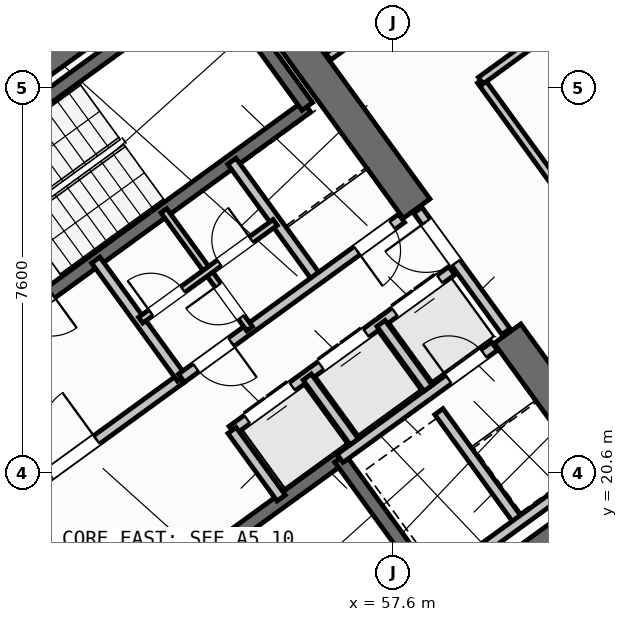
"""IFC4 building model, lengths in metres.
Left out: names, types, materials, properties, quantities, classifications, styles, units other than length and angle.
Written with IfcOpenShell. Run it as: python <this file> out.ifc"""

import sys

from ifc_helpers import new_model, si_unit, direction, frame, frame_2d, origin, place, context, subcontext, project, spatial, rectangle, extrude, source, transform, mapped, element, fill, save


model = new_model("IFC4")
c1 = context("Model", 3, precision=1e-05, world=origin(), true_north=direction((0.0, 1.0)))
c2 = subcontext(c1, "Body", "Model", "MODEL_VIEW")
j1 = project(units=[si_unit("LENGTHUNIT", "METRE"), si_unit("PLANEANGLEUNIT", "RADIAN")], contexts=[c1])
p1 = place(None, origin())
s1 = spatial("IfcSite", under=j1, at=p1, CompositionType="ELEMENT")
p2 = place(p1, origin())
s2 = spatial("IfcBuilding", under=s1, at=p2, CompositionType="ELEMENT")
p3 = place(p2, frame((0.0, 0.0, 34.8)))
s3 = spatial("IfcBuildingStorey", under=s2, at=p3, CompositionType="ELEMENT", Elevation=34.8)
p4 = place(p3, frame((52.318, 13.11, 0.0), z_axis=(0.0, 0.0, 1.0), x_axis=(0.809019445368, 0.587781878776, 0.0)))
e1 = element("IfcWall", 1, at=p4, inside=s3, PredefinedType="SHEAR", context=c2, shape_type="SweptSolid", body=[
    extrude(rectangle(XDim=12.44, YDim=0.65, at=frame_2d((6.22, 0.0))), origin(), (0.0, 0.0, 1.0), 3.35),
])
p5 = place(p3, frame((44.325, 24.113, 0.0), z_axis=(0.0, 0.0, 1.0), x_axis=(0.809012664862, 0.58779121131, 0.0)))
e2 = element("IfcWall", 2, at=p5, inside=s3, PredefinedType="SHEAR", context=c2, shape_type="SweptSolid", body=[
    extrude(rectangle(XDim=12.44, YDim=0.65, at=frame_2d((6.22, 0.0))), origin(), (0.0, 0.0, 1.0), 3.35),
])
p6 = place(p3, frame((61.929, 20.494, 0.0), z_axis=(0.0, 0.0, 1.0), x_axis=(-0.58782982593, 0.808984607855, 0.0)))
e3 = element("IfcWall", 3, at=p6, inside=s3, PredefinedType="SHEAR", context=c2, shape_type="SweptSolid", body=[
    extrude(rectangle(XDim=3.525, YDim=0.65, at=frame_2d((1.762, 0.0))), origin(), (0.0, 0.0, 1.0), 3.35),
])
p7 = place(p3, frame((58.064, 25.813, 0.0), z_axis=(0.0, 0.0, 1.0), x_axis=(-0.58777996584, 0.809020835181, 0.0)))
e4 = element("IfcWall", 4, at=p7, inside=s3, PredefinedType="SHEAR", context=c2, shape_type="SweptSolid", body=[
    extrude(rectangle(XDim=6.375, YDim=0.65, at=frame_2d((3.188, 0.0))), origin(), (0.0, 0.0, 1.0), 3.35),
])
p8 = place(p3, frame((43.938, 25.192, 0.0), z_axis=(0.0, 0.0, 1.0), x_axis=(0.809016324578, 0.587786174187, 0.0)))
e5 = element("IfcWall", 5, at=p8, inside=s3, PredefinedType="STANDARD", context=c2, shape_type="SweptSolid", body=[
    extrude(rectangle(XDim=17.587, YDim=0.32, at=frame_2d((8.794, 0.0))), origin(), (0.0, 0.0, 1.0), 3.35),
])
p9 = place(p8, frame((14.914, 0.0, 0.0)))
e6 = element("IfcOpeningElement", 6, at=p9, cuts=e5, PredefinedType="OPENING", context=c2, shape_type="SweptSolid", body=[
    extrude(rectangle(XDim=1.05, YDim=2.15, at=frame_2d((0.525, 1.075))), frame((0.0, 0.17, 0.0), z_axis=(0.0, -1.0, 0.0), x_axis=(1.0, 0.0, 0.0)), (0.0, 0.0, 1.0), 0.34),
])
p10 = place(p8, frame((2.169, 0.0, 0.8)))
e7 = element("IfcOpeningElement", 7, at=p10, cuts=e5, PredefinedType="OPENING", context=c2, shape_type="SweptSolid", body=[
    extrude(rectangle(XDim=2.1, YDim=1.55, at=frame_2d((1.05, 0.775))), frame((0.0, 0.17, 0.0), z_axis=(0.0, -1.0, 0.0), x_axis=(1.0, 0.0, 0.0)), (0.0, 0.0, 1.0), 0.34),
])
p11 = place(p8, frame((7.319, 0.0, 0.8)))
e8 = element("IfcOpeningElement", 8, at=p11, cuts=e5, PredefinedType="OPENING", context=c2, shape_type="SweptSolid", body=[
    extrude(rectangle(XDim=2.1, YDim=1.55, at=frame_2d((1.05, 0.775))), frame((0.0, 0.17, 0.0), z_axis=(0.0, -1.0, 0.0), x_axis=(1.0, 0.0, 0.0)), (0.0, 0.0, 1.0), 0.34),
])
p12 = place(p3, frame((58.455, 35.484, 0.0), z_axis=(0.0, 0.0, 1.0), x_axis=(0.587783625747, -0.809018176127, 0.0)))
e9 = element("IfcWall", 9, at=p12, inside=s3, PredefinedType="STANDARD", context=c2, shape_type="SweptSolid", body=[
    extrude(rectangle(XDim=21.587, YDim=0.32, at=frame_2d((10.794, 0.0))), origin(), (0.0, 0.0, 1.0), 2.725),
])
p13 = place(p12, frame((1.529, 0.0, 0.85)))
e10 = element("IfcOpeningElement", 10, at=p13, cuts=e9, PredefinedType="OPENING", context=c2, shape_type="SweptSolid", body=[
    extrude(rectangle(XDim=1.8, YDim=1.5, at=frame_2d((0.9, 0.75))), frame((0.0, 0.17, 0.0), z_axis=(0.0, -1.0, 0.0), x_axis=(1.0, 0.0, 0.0)), (0.0, 0.0, 1.0), 0.34),
])
p14 = place(p12, frame((10.444, 0.0, 0.85)))
e11 = element("IfcOpeningElement", 11, at=p14, cuts=e9, PredefinedType="OPENING", context=c2, shape_type="SweptSolid", body=[
    extrude(rectangle(XDim=1.8, YDim=1.5, at=frame_2d((0.9, 0.75))), frame((0.0, 0.17, 0.0), z_axis=(0.0, -1.0, 0.0), x_axis=(1.0, 0.0, 0.0)), (0.0, 0.0, 1.0), 0.34),
])
p15 = place(p12, frame((17.595, 0.0, 0.85)))
e12 = element("IfcOpeningElement", 12, at=p15, cuts=e9, PredefinedType="OPENING", context=c2, shape_type="SweptSolid", body=[
    extrude(rectangle(XDim=1.5, YDim=1.5, at=frame_2d((0.75, 0.75))), frame((0.0, 0.17, 0.0), z_axis=(0.0, -1.0, 0.0), x_axis=(1.0, 0.0, 0.0)), (0.0, 0.0, 1.0), 0.34),
])
p16 = place(p3, frame((48.006, 25.996, 0.0), z_axis=(0.0, 0.0, 1.0), x_axis=(0.80901903764, 0.587782439969, 0.0)))
e13 = element("IfcWall", 13, at=p16, inside=s3, PredefinedType="SHEAR", context=c2, shape_type="SweptSolid", body=[
    extrude(rectangle(XDim=7.46, YDim=0.26, at=frame_2d((3.73, 0.0))), origin(), (0.0, 0.0, 1.0), 3.35),
])
p17 = place(p3, frame((49.863, 23.44, 0.0), z_axis=(0.0, 0.0, 1.0), x_axis=(0.809003474932, 0.587803859759, 0.0)))
e14 = element("IfcWall", 14, at=p17, inside=s3, PredefinedType="SHEAR", context=c2, shape_type="SweptSolid", body=[
    extrude(rectangle(XDim=7.46, YDim=0.26, at=frame_2d((3.73, 0.0))), origin(), (0.0, 0.0, 1.0), 3.35),
])
p18 = place(p17, frame((0.36, 0.0, 0.0)))
e15 = element("IfcOpeningElement", 15, at=p18, cuts=e14, PredefinedType="OPENING", context=c2, shape_type="SweptSolid", body=[
    extrude(rectangle(XDim=0.86, YDim=2.05, at=frame_2d((0.43, 1.025))), frame((0.0, 0.14, 0.0), z_axis=(0.0, -1.0, 0.0), x_axis=(1.0, 0.0, 0.0)), (0.0, 0.0, 1.0), 0.28),
])
p19 = place(p3, frame((55.906, 27.831, 0.0), z_axis=(0.0, 0.0, 1.0), x_axis=(-0.587804123638, 0.809003283204, 0.0)))
e16 = element("IfcWall", 16, at=p19, inside=s3, PredefinedType="SHEAR", context=c2, shape_type="SweptSolid", body=[
    extrude(rectangle(XDim=3.16, YDim=0.26, at=frame_2d((1.58, 0.0))), origin(), (0.0, 0.0, 1.0), 3.35),
])
p20 = place(p3, frame((50.615, 16.57, 0.0), z_axis=(0.0, 0.0, 1.0), x_axis=(0.809028366311, 0.587769599847, 0.0)))
e17 = element("IfcWall", 17, at=p20, inside=s3, PredefinedType="SHEAR", context=c2, shape_type="SweptSolid", body=[
    extrude(rectangle(XDim=7.33, YDim=0.26, at=frame_2d((3.665, 0.0))), origin(), (0.0, 0.0, 1.0), 3.35),
])
p21 = place(p20, frame((0.22, 0.0, 0.0)))
e18 = element("IfcOpeningElement", 18, at=p21, cuts=e17, PredefinedType="OPENING", context=c2, shape_type="SweptSolid", body=[
    extrude(rectangle(XDim=1.1, YDim=2.1, at=frame_2d((0.55, 1.05))), frame((0.0, 0.14, 0.0), z_axis=(0.0, -1.0, 0.0), x_axis=(1.0, 0.0, 0.0)), (0.0, 0.0, 1.0), 0.28),
])
p22 = place(p3, frame((58.41, 18.327, 0.0), z_axis=(0.0, 0.0, 1.0), x_axis=(-0.58776738483, 0.809029975545, 0.0)))
e19 = element("IfcWall", 19, at=p22, inside=s3, PredefinedType="SHEAR", context=c2, shape_type="SweptSolid", body=[
    extrude(rectangle(XDim=3.16, YDim=0.26, at=frame_2d((1.58, 0.0))), origin(), (0.0, 0.0, 1.0), 3.35),
])
p23 = place(p3, frame((48.799, 19.107, 0.0), z_axis=(0.0, 0.0, 1.0), x_axis=(0.809012959416, 0.587790805897, 0.0)))
e20 = element("IfcWall", 20, at=p23, inside=s3, PredefinedType="STANDARD", context=c2, shape_type="SweptSolid", body=[
    extrude(rectangle(XDim=5.718, YDim=0.2, at=frame_2d((2.859, 0.0))), origin(), (0.0, 0.0, 1.0), 3.34),
])
p24 = place(p23, frame((2.498, 0.0, 0.0)))
e21 = element("IfcOpeningElement", 21, at=p24, cuts=e20, PredefinedType="OPENING", context=c2, shape_type="SweptSolid", body=[
    extrude(rectangle(XDim=1.15, YDim=2.1, at=frame_2d((0.575, 1.05))), frame((0.0, 0.11, 0.0), z_axis=(0.0, -1.0, 0.0), x_axis=(1.0, 0.0, 0.0)), (0.0, 0.0, 1.0), 0.22),
])
p25 = place(p3, frame((56.553, 20.884, 0.0), z_axis=(0.0, 0.0, 1.0), x_axis=(0.809035789462, 0.587759382205, 0.0)))
e22 = element("IfcWall", 22, at=p25, inside=s3, PredefinedType="STANDARD", context=c2, shape_type="SweptSolid", body=[
    extrude(rectangle(XDim=3.768, YDim=0.2, at=frame_2d((1.884, 0.0))), origin(), (0.0, 0.0, 1.0), 3.34),
])
p26 = place(p25, frame((2.65, 0.0, 0.0)))
e23 = element("IfcOpeningElement", 23, at=p26, cuts=e22, PredefinedType="OPENING", context=c2, shape_type="SweptSolid", body=[
    extrude(rectangle(XDim=0.86, YDim=2.05, at=frame_2d((0.43, 1.025))), frame((0.0, 0.11, 0.0), z_axis=(0.0, -1.0, 0.0), x_axis=(1.0, 0.0, 0.0)), (0.0, 0.0, 1.0), 0.22),
])
p27 = place(p3, frame((54.421, 21.436, 0.0), z_axis=(0.0, 0.0, 1.0), x_axis=(0.809013710463, 0.587789772183, 0.0)))
e24 = element("IfcWall", 24, at=p27, inside=s3, PredefinedType="STANDARD", context=c2, shape_type="SweptSolid", body=[
    extrude(rectangle(XDim=5.36, YDim=0.2, at=frame_2d((2.68, 0.0))), origin(), (0.0, 0.0, 1.0), 3.34),
])
p28 = place(p27, frame((0.37, 0.0, 0.0)))
e25 = element("IfcOpeningElement", 25, at=p28, cuts=e24, PredefinedType="OPENING", context=c2, shape_type="SweptSolid", body=[
    extrude(rectangle(XDim=1.1, YDim=2.15, at=frame_2d((0.55, 1.075))), frame((0.0, 0.11, 0.0), z_axis=(0.0, -1.0, 0.0), x_axis=(1.0, 0.0, 0.0)), (0.0, 0.0, 1.0), 0.22),
])
p29 = place(p27, frame((2.17, 0.0, 0.0)))
e26 = element("IfcOpeningElement", 26, at=p29, cuts=e24, PredefinedType="OPENING", context=c2, shape_type="SweptSolid", body=[
    extrude(rectangle(XDim=1.1, YDim=2.15, at=frame_2d((0.55, 1.075))), frame((0.0, 0.11, 0.0), z_axis=(0.0, -1.0, 0.0), x_axis=(1.0, 0.0, 0.0)), (0.0, 0.0, 1.0), 0.22),
])
p30 = place(p27, frame((3.97, 0.0, 0.0)))
e27 = element("IfcOpeningElement", 27, at=p30, cuts=e24, PredefinedType="OPENING", context=c2, shape_type="SweptSolid", body=[
    extrude(rectangle(XDim=1.1, YDim=2.15, at=frame_2d((0.55, 1.075))), frame((0.0, 0.11, 0.0), z_axis=(0.0, -1.0, 0.0), x_axis=(1.0, 0.0, 0.0)), (0.0, 0.0, 1.0), 0.22),
])
p31 = place(p3, frame((55.391, 20.102, 0.0), z_axis=(0.0, 0.0, 1.0), x_axis=(-0.58778447739, 0.809017557374, 0.0)))
e28 = element("IfcWall", 28, at=p31, inside=s3, PredefinedType="STANDARD", context=c2, shape_type="SweptSolid", body=[
    extrude(rectangle(XDim=1.65, YDim=0.2, at=frame_2d((0.825, 0.0))), origin(), (0.0, 0.0, 1.0), 3.34),
])
p32 = place(p3, frame((56.834, 21.212, 0.0), z_axis=(0.0, 0.0, 1.0), x_axis=(-0.58776738483, 0.809029975545, 0.0)))
e29 = element("IfcWall", 29, at=p32, inside=s3, PredefinedType="STANDARD", context=c2, shape_type="SweptSolid", body=[
    extrude(rectangle(XDim=1.58, YDim=0.2, at=frame_2d((0.79, 0.0))), origin(), (0.0, 0.0, 1.0), 3.34),
])
p33 = place(p3, frame((58.29, 22.27, 0.0), z_axis=(0.0, 0.0, 1.0), x_axis=(-0.587840865826, 0.808976585857, 0.0)))
e30 = element("IfcWall", 30, at=p33, inside=s3, PredefinedType="STANDARD", context=c2, shape_type="SweptSolid", body=[
    extrude(rectangle(XDim=1.58, YDim=0.2, at=frame_2d((0.79, 0.0))), origin(), (0.0, 0.0, 1.0), 3.34),
])
p34 = place(p3, frame((60.067, 19.655, 0.0), z_axis=(0.0, 0.0, 1.0), x_axis=(-0.587800520745, 0.809005900975, 0.0)))
e31 = element("IfcWall", 31, at=p34, inside=s3, PredefinedType="STANDARD", context=c2, shape_type="SweptSolid", body=[
    extrude(rectangle(XDim=2.66, YDim=0.2, at=frame_2d((1.33, 0.0))), origin(), (0.0, 0.0, 1.0), 3.34),
])
p35 = place(p3, frame((58.472, 18.447, 0.0), z_axis=(0.0, 0.0, 1.0), x_axis=(0.809022487728, 0.587777691266, 0.0)))
e32 = element("IfcWall", 32, at=p35, inside=s3, PredefinedType="STANDARD", context=c2, shape_type="SweptSolid", body=[
    extrude(rectangle(XDim=3.648, YDim=0.2, at=frame_2d((1.824, 0.0))), origin(), (0.0, 0.0, 1.0), 3.34),
])
p36 = place(p3, frame((53.425, 22.468, 0.0), z_axis=(0.0, 0.0, 1.0), x_axis=(-0.5877230039, 0.809062216821, 0.0)))
e33 = element("IfcWall", 33, at=p36, inside=s3, PredefinedType="STANDARD", context=c2, shape_type="SweptSolid", body=[
    extrude(rectangle(XDim=2.88, YDim=0.2, at=frame_2d((1.44, 0.0))), origin(), (0.0, 0.0, 1.0), 3.34),
])
p37 = place(p3, frame((56.111, 24.419, 0.0), z_axis=(0.0, 0.0, 1.0), x_axis=(-0.58777848983, 0.809021907548, 0.0)))
e34 = element("IfcWall", 34, at=p37, inside=s3, PredefinedType="STANDARD", context=c2, shape_type="SweptSolid", body=[
    extrude(rectangle(XDim=2.88, YDim=0.2, at=frame_2d((1.44, 0.0))), origin(), (0.0, 0.0, 1.0), 3.34),
])
p38 = place(p3, frame((53.425, 22.468, 0.0), z_axis=(0.0, 0.0, 1.0), x_axis=(0.80902705128, 0.587771409902, 0.0)))
e35 = element("IfcWall", 35, at=p38, inside=s3, PredefinedType="STANDARD", context=c2, shape_type="SweptSolid", body=[
    extrude(rectangle(XDim=5.368, YDim=0.2, at=frame_2d((2.684, 0.0))), origin(), (0.0, 0.0, 1.0), 3.34),
])
p39 = place(p38, frame((4.28, 0.0, 0.0)))
e36 = element("IfcOpeningElement", 36, at=p39, cuts=e35, PredefinedType="OPENING", context=c2, shape_type="SweptSolid", body=[
    extrude(rectangle(XDim=0.86, YDim=2.05, at=frame_2d((0.43, 1.025))), frame((0.0, 0.11, 0.0), z_axis=(0.0, -1.0, 0.0), x_axis=(1.0, 0.0, 0.0)), (0.0, 0.0, 1.0), 0.22),
])
p40 = place(p38, frame((0.35, 0.0, 0.0)))
e37 = element("IfcOpeningElement", 37, at=p40, cuts=e35, PredefinedType="OPENING", context=c2, shape_type="SweptSolid", body=[
    extrude(rectangle(XDim=0.86, YDim=2.05, at=frame_2d((0.43, 1.025))), frame((0.0, 0.11, 0.0), z_axis=(0.0, -1.0, 0.0), x_axis=(1.0, 0.0, 0.0)), (0.0, 0.0, 1.0), 0.22),
])
p41 = place(p3, frame((54.768, 23.443, 0.0), z_axis=(0.0, 0.0, 1.0), x_axis=(-0.587736077749, 0.809052719489, 0.0)))
e38 = element("IfcWall", 38, at=p41, inside=s3, PredefinedType="PLUMBINGWALL", context=c2, shape_type="SweptSolid", body=[
    extrude(rectangle(XDim=1.4, YDim=0.14, at=frame_2d((0.7, 0.0))), origin(), (0.0, 0.0, 1.0), 3.34),
])
p42 = place(p41, frame((0.28, 0.0, 0.0)))
e39 = element("IfcOpeningElement", 39, at=p42, cuts=e38, PredefinedType="OPENING", context=c2, shape_type="SweptSolid", body=[
    extrude(rectangle(XDim=0.78, YDim=2.05, at=frame_2d((0.39, 1.025))), frame((0.0, 0.08, 0.0), z_axis=(0.0, -1.0, 0.0), x_axis=(1.0, 0.0, 0.0)), (0.0, 0.0, 1.0), 0.16),
])
p43 = place(p3, frame((53.945, 24.576, 0.0), z_axis=(0.0, 0.0, 1.0), x_axis=(-0.587897037186, 0.808935766095, 0.0)))
e40 = element("IfcWall", 40, at=p43, inside=s3, PredefinedType="PLUMBINGWALL", context=c2, shape_type="SweptSolid", body=[
    extrude(rectangle(XDim=1.48, YDim=0.14, at=frame_2d((0.74, 0.0))), origin(), (0.0, 0.0, 1.0), 3.34),
])
p44 = place(p3, frame((52.618, 23.612, 0.0), z_axis=(0.0, 0.0, 1.0), x_axis=(0.809009587469, 0.587795446889, 0.0)))
e41 = element("IfcWall", 41, at=p44, inside=s3, PredefinedType="PLUMBINGWALL", context=c2, shape_type="SweptSolid", body=[
    extrude(rectangle(XDim=3.28, YDim=0.14, at=frame_2d((1.64, 0.0))), origin(), (0.0, 0.0, 1.0), 3.34),
])
p45 = place(p44, frame((0.25, 0.0, 0.0)))
e42 = element("IfcOpeningElement", 42, at=p45, cuts=e41, PredefinedType="OPENING", context=c2, shape_type="SweptSolid", body=[
    extrude(rectangle(XDim=0.78, YDim=2.05, at=frame_2d((0.39, 1.025))), frame((0.0, 0.08, 0.0), z_axis=(0.0, -1.0, 0.0), x_axis=(1.0, 0.0, 0.0)), (0.0, 0.0, 1.0), 0.16),
])
p46 = place(p44, frame((1.92, 0.0, 0.0)))
e43 = element("IfcOpeningElement", 43, at=p46, cuts=e41, PredefinedType="OPENING", context=c2, shape_type="SweptSolid", body=[
    extrude(rectangle(XDim=0.78, YDim=2.05, at=frame_2d((0.39, 1.025))), frame((0.0, 0.08, 0.0), z_axis=(0.0, -1.0, 0.0), x_axis=(1.0, 0.0, 0.0)), (0.0, 0.0, 1.0), 0.16),
])
p47 = place(p3, frame((59.827, 23.386, 0.0), z_axis=(0.0, 0.0, 1.0), x_axis=(-0.587803840107, 0.809003489211, 0.0)))
e44 = element("IfcWall", 44, at=p47, inside=s3, PredefinedType="STANDARD", context=c2, shape_type="SweptSolid", body=[
    extrude(rectangle(XDim=2.96, YDim=0.2, at=frame_2d((1.48, 0.0))), origin(), (0.0, 0.0, 1.0), 3.34),
])
p48 = place(p47, frame((1.68, 0.0, 0.0)))
e45 = element("IfcOpeningElement", 45, at=p48, cuts=e44, PredefinedType="OPENING", context=c2, shape_type="SweptSolid", body=[
    extrude(rectangle(XDim=1.0, YDim=2.1, at=frame_2d((0.5, 1.05))), frame((0.0, 0.11, 0.0), z_axis=(0.0, -1.0, 0.0), x_axis=(1.0, 0.0, 0.0)), (0.0, 0.0, 1.0), 0.22),
])
p49 = place(p3, frame((56.321, 28.812, 0.0), z_axis=(0.0, 0.0, 1.0), x_axis=(0.809029482429, 0.587768063577, 0.0)))
e46 = element("IfcWall", 46, at=p49, inside=s3, PredefinedType="PARTITIONING", context=c2, shape_type="SweptSolid", body=[
    extrude(rectangle(XDim=2.158, YDim=0.16, at=frame_2d((1.079, 0.0))), origin(), (0.0, 0.0, 1.0), 3.34),
])
p50 = place(p49, frame((0.598, 0.0, 0.0)))
e47 = element("IfcOpeningElement", 47, at=p50, cuts=e46, PredefinedType="OPENING", context=c2, shape_type="SweptSolid", body=[
    extrude(rectangle(XDim=1.0, YDim=2.1, at=frame_2d((0.5, 1.05))), frame((0.0, 0.09, 0.0), z_axis=(0.0, -1.0, 0.0), x_axis=(1.0, 0.0, 0.0)), (0.0, 0.0, 1.0), 0.18),
])
p51 = place(p3, frame((68.353, 15.922, 0.0), z_axis=(0.0, 0.0, 1.0), x_axis=(-0.587782002009, 0.809019355834, 0.0)))
e48 = element("IfcWall", 48, at=p51, inside=s3, PredefinedType="PARTITIONING", context=c2, shape_type="SweptSolid", body=[
    extrude(rectangle(XDim=15.35, YDim=0.16, at=frame_2d((7.675, 0.0))), origin(), (0.0, 0.0, 1.0), 3.34),
])
p52 = place(p3, frame((59.331, 28.341, 0.0), z_axis=(0.0, 0.0, 1.0), x_axis=(0.809003564202, 0.587803736896, 0.0)))
e49 = element("IfcWall", 49, at=p52, inside=s3, PredefinedType="PARTITIONING", context=c2, shape_type="SweptSolid", body=[
    extrude(rectangle(XDim=3.63, YDim=0.16, at=frame_2d((1.815, 0.0))), origin(), (0.0, 0.0, 1.0), 3.34),
])
p53 = place(p52, frame((1.305, 0.0, 0.0)))
e50 = element("IfcOpeningElement", 50, at=p53, cuts=e49, PredefinedType="OPENING", context=c2, shape_type="SweptSolid", body=[
    extrude(rectangle(XDim=1.0, YDim=2.1, at=frame_2d((0.5, 1.05))), frame((0.0, 0.09, 0.0), z_axis=(0.0, -1.0, 0.0), x_axis=(1.0, 0.0, 0.0)), (0.0, 0.0, 1.0), 0.18),
])
p54 = place(p3, frame((53.705, 11.126, 0.0), z_axis=(0.0, 0.0, 1.0), x_axis=(0.809014504436, 0.587788679384, 0.0)))
e51 = element("IfcWall", 51, at=p54, inside=s3, PredefinedType="PARTITIONING", context=c2, shape_type="SweptSolid", body=[
    extrude(rectangle(XDim=14.67, YDim=0.16, at=frame_2d((7.335, 0.0))), origin(), (0.0, 0.0, 1.0), 3.34),
])
p55 = place(p54, frame((3.215, 0.0, 0.0)))
e52 = element("IfcOpeningElement", 52, at=p55, cuts=e51, PredefinedType="OPENING", context=c2, shape_type="SweptSolid", body=[
    extrude(rectangle(XDim=1.0, YDim=2.1, at=frame_2d((0.5, 1.05))), frame((0.0, 0.09, 0.0), z_axis=(0.0, -1.0, 0.0), x_axis=(1.0, 0.0, 0.0)), (0.0, 0.0, 1.0), 0.18),
])
p56 = place(p54, frame((9.915, 0.0, 0.0)))
e53 = element("IfcOpeningElement", 53, at=p56, cuts=e51, PredefinedType="OPENING", context=c2, shape_type="SweptSolid", body=[
    extrude(rectangle(XDim=1.0, YDim=2.1, at=frame_2d((0.5, 1.05))), frame((0.0, 0.09, 0.0), z_axis=(0.0, -1.0, 0.0), x_axis=(1.0, 0.0, 0.0)), (0.0, 0.0, 1.0), 0.18),
])
m1 = source(origin(), c2, "Body", "SweptSolid", [
    extrude(rectangle(XDim=1.15, YDim=2.1, at=frame_2d((0.575, 1.05))), frame((0.0, 0.025, 0.0), z_axis=(0.0, -1.0, 0.0), x_axis=(1.0, 0.0, 0.0)), (0.0, 0.0, 1.0), 0.05),
])
p57 = place(p24, origin())
e54 = element("IfcDoor", 54, at=p57, inside=s3, OperationType="SINGLE_SWING_RIGHT", PredefinedType="DOOR", context=c2, shape_type="MappedRepresentation", body=[
    mapped(m1, transform((0.0, 0.0, 0.0), scale=1.0)),
])
fill(e21, e54)
m2 = source(origin(), c2, "Body", "SweptSolid", [
    extrude(rectangle(XDim=1.1, YDim=2.15, at=frame_2d((0.55, 1.075))), frame((0.0, 0.025, 0.0), z_axis=(0.0, -1.0, 0.0), x_axis=(1.0, 0.0, 0.0)), (0.0, 0.0, 1.0), 0.05),
])
p58 = place(p28, origin())
e55 = element("IfcDoor", 55, at=p58, inside=s3, OperationType="DOUBLE_DOOR_SLIDING", PredefinedType="DOOR", context=c2, shape_type="MappedRepresentation", body=[
    mapped(m2, transform((0.0, 0.0, 0.0), scale=1.0)),
])
fill(e25, e55)
p59 = place(p29, origin())
e56 = element("IfcDoor", 56, at=p59, inside=s3, OperationType="DOUBLE_DOOR_SLIDING", PredefinedType="DOOR", context=c2, shape_type="MappedRepresentation", body=[
    mapped(m2, transform((0.0, 0.0, 0.0), scale=1.0)),
])
fill(e26, e56)
p60 = place(p30, origin())
e57 = element("IfcDoor", 57, at=p60, inside=s3, OperationType="DOUBLE_DOOR_SLIDING", PredefinedType="DOOR", context=c2, shape_type="MappedRepresentation", body=[
    mapped(m2, transform((0.0, 0.0, 0.0), scale=1.0)),
])
fill(e27, e57)
m3 = source(origin(), c2, "Body", "SweptSolid", [
    extrude(rectangle(XDim=0.86, YDim=2.05, at=frame_2d((0.43, 1.025))), frame((0.0, 0.025, 0.0), z_axis=(0.0, -1.0, 0.0), x_axis=(1.0, 0.0, 0.0)), (0.0, 0.0, 1.0), 0.05),
])
p61 = place(p26, origin())
e58 = element("IfcDoor", 58, at=p61, inside=s3, OperationType="SINGLE_SWING_LEFT", PredefinedType="DOOR", context=c2, shape_type="MappedRepresentation", body=[
    mapped(m3, transform((0.0, 0.0, 0.0), scale=1.0)),
])
fill(e23, e58)
p62 = place(p39, frame((0.86, 0.0, 0.0), z_axis=(0.0, 0.0, 1.0), x_axis=(-1.0, 0.0, 0.0)))
e59 = element("IfcDoor", 59, at=p62, inside=s3, OperationType="SINGLE_SWING_RIGHT", PredefinedType="DOOR", context=c2, shape_type="MappedRepresentation", body=[
    mapped(m3, transform((0.0, 0.0, 0.0), scale=1.0)),
])
fill(e36, e59)
p63 = place(p40, frame((0.86, 0.0, 0.0), z_axis=(0.0, 0.0, 1.0), x_axis=(-1.0, 0.0, 0.0)))
e60 = element("IfcDoor", 60, at=p63, inside=s3, OperationType="SINGLE_SWING_LEFT", PredefinedType="DOOR", context=c2, shape_type="MappedRepresentation", body=[
    mapped(m3, transform((0.0, 0.0, 0.0), scale=1.0)),
])
fill(e37, e60)
m4 = source(origin(), c2, "Body", "SweptSolid", [
    extrude(rectangle(XDim=0.78, YDim=2.05, at=frame_2d((0.39, 1.025))), frame((0.0, 0.025, 0.0), z_axis=(0.0, -1.0, 0.0), x_axis=(1.0, 0.0, 0.0)), (0.0, 0.0, 1.0), 0.05),
])
p64 = place(p42, origin())
e61 = element("IfcDoor", 61, at=p64, inside=s3, OperationType="SINGLE_SWING_RIGHT", PredefinedType="DOOR", context=c2, shape_type="MappedRepresentation", body=[
    mapped(m4, transform((0.0, 0.0, 0.0), scale=1.0)),
])
fill(e39, e61)
p65 = place(p45, origin())
e62 = element("IfcDoor", 62, at=p65, inside=s3, OperationType="SINGLE_SWING_LEFT", PredefinedType="DOOR", context=c2, shape_type="MappedRepresentation", body=[
    mapped(m4, transform((0.0, 0.0, 0.0), scale=1.0)),
])
fill(e42, e62)
p66 = place(p46, origin())
e63 = element("IfcDoor", 63, at=p66, inside=s3, OperationType="SINGLE_SWING_RIGHT", PredefinedType="DOOR", context=c2, shape_type="MappedRepresentation", body=[
    mapped(m4, transform((0.0, 0.0, 0.0), scale=1.0)),
])
fill(e43, e63)
m5 = source(origin(), c2, "Body", "SweptSolid", [
    extrude(rectangle(XDim=1.0, YDim=2.1, at=frame_2d((0.5, 1.05))), frame((0.0, 0.025, 0.0), z_axis=(0.0, -1.0, 0.0), x_axis=(1.0, 0.0, 0.0)), (0.0, 0.0, 1.0), 0.05),
])
p67 = place(p48, origin())
e64 = element("IfcDoor", 64, at=p67, inside=s3, OperationType="SINGLE_SWING_RIGHT", PredefinedType="DOOR", context=c2, shape_type="MappedRepresentation", body=[
    mapped(m5, transform((0.0, 0.0, 0.0), scale=1.0)),
])
fill(e45, e64)
save(model, sys.argv[1])
